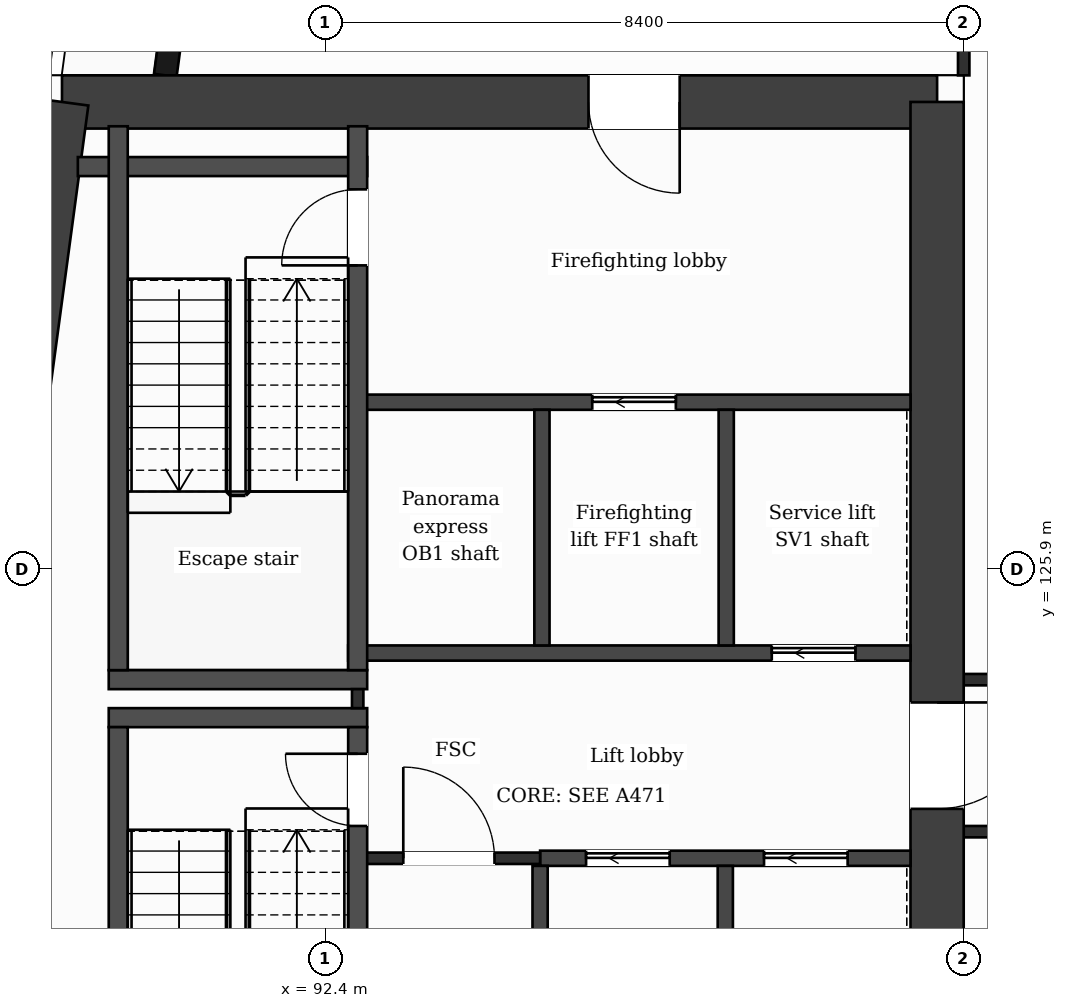
"""IFC4 building model, lengths in metres.
Left out: names, types, materials, properties, quantities, classifications, styles, units other than length and angle.
Written with IfcOpenShell. Run it as: python <this file> out.ifc"""

import sys

from ifc_helpers import new_model, si_unit, direction, frame, frame_2d, origin, place, context, subcontext, project, spatial, rectangle, extrude, element, fill, save


model = new_model("IFC4")
c1 = context("Model", 3, precision=1e-05, world=origin(), true_north=direction((0.0, 1.0)))
c2 = subcontext(c1, "Body", "Model", "MODEL_VIEW")
j1 = project(units=[si_unit("LENGTHUNIT", "METRE"), si_unit("PLANEANGLEUNIT", "RADIAN")], contexts=[c1])
p1 = place(None, origin())
s1 = spatial("IfcSite", under=j1, at=p1, CompositionType="ELEMENT")
p2 = place(p1, origin())
s2 = spatial("IfcBuilding", under=s1, at=p2, CompositionType="ELEMENT")
p3 = place(p2, frame((0.0, 0.0, 288.6)))
s3 = spatial("IfcBuildingStorey", under=s2, at=p3, CompositionType="ELEMENT", Elevation=288.6)
p4 = place(p3, frame((88.937, 132.05, 0.0), z_axis=(0.0, 0.0, 1.0), x_axis=(1.0, 0.0, 0.0)))
e1 = element("IfcWall", 1, at=p4, inside=s3, PredefinedType="SHEAR", context=c2, shape_type="SweptSolid", body=[
    extrude(rectangle(XDim=11.513, YDim=0.7, at=frame_2d((5.757, 0.0))), origin(), (0.0, 0.0, 1.0), 3.7),
])
p5 = place(p4, frame((6.927, 0.0, 0.0)))
e2 = element("IfcOpeningElement", 2, at=p5, cuts=e1, PredefinedType="OPENING", context=c2, shape_type="SweptSolid", body=[
    extrude(rectangle(XDim=1.2, YDim=2.1, at=frame_2d((0.6, 1.05))), frame((0.0, 0.36, 0.0), z_axis=(0.0, -1.0, 0.0), x_axis=(1.0, 0.0, 0.0)), (0.0, 0.0, 1.0), 0.72),
])
p6 = place(p3, frame((100.45, 132.05, 0.0), z_axis=(0.0, 0.0, 1.0), x_axis=(0.0, -1.0, 0.0)))
e3 = element("IfcWall", 3, at=p6, inside=s3, PredefinedType="SHEAR", context=c2, shape_type="SweptSolid", body=[
    extrude(rectangle(XDim=15.7, YDim=0.7, at=frame_2d((7.85, 0.0))), origin(), (0.0, 0.0, 1.0), 3.7),
])
p7 = place(p6, frame((7.9, 0.0, 0.0)))
e4 = element("IfcOpeningElement", 4, at=p7, cuts=e3, PredefinedType="OPENING", context=c2, shape_type="SweptSolid", body=[
    extrude(rectangle(XDim=1.4, YDim=2.1, at=frame_2d((0.7, 1.05))), frame((0.0, 0.36, 0.0), z_axis=(0.0, -1.0, 0.0), x_axis=(1.0, 0.0, 0.0)), (0.0, 0.0, 1.0), 0.72),
])
p8 = place(p3, frame((86.823, 116.35, 0.0), z_axis=(0.0, 0.0, 1.0), x_axis=(0.133416378607, 0.99106007382, 0.0)))
e5 = element("IfcWall", 5, at=p8, inside=s3, PredefinedType="SHEAR", context=c2, shape_type="SweptSolid", body=[
    extrude(rectangle(XDim=15.842, YDim=0.7, at=frame_2d((7.921, 0.0))), origin(), (0.0, 0.0, 1.0), 3.7),
])
p9 = place(p3, frame((91.177, 138.95, 0.0), z_axis=(0.0, 0.0, 1.0), x_axis=(-0.133426664613, -0.991058689065, 0.0)))
e6 = element("IfcWall", 6, at=p9, inside=s3, PredefinedType="SOLIDWALL", context=c2, shape_type="SweptSolid", body=[
    extrude(rectangle(XDim=6.609, YDim=0.3, at=frame_2d((3.305, 0.0))), origin(), (0.0, 0.0, 1.0), 3.38),
])
p10 = place(p9, frame((1.039, 0.0, 0.9)))
e7 = element("IfcOpeningElement", 7, at=p10, cuts=e6, PredefinedType="OPENING", context=c2, shape_type="SweptSolid", body=[
    extrude(rectangle(XDim=1.2, YDim=2.1, at=frame_2d((0.6, 1.05))), frame((0.0, 0.16, 0.0), z_axis=(0.0, -1.0, 0.0), x_axis=(1.0, 0.0, 0.0)), (0.0, 0.0, 1.0), 0.32),
])
p11 = place(p9, frame((4.294, 0.0, 0.0)))
e8 = element("IfcOpeningElement", 8, at=p11, cuts=e6, PredefinedType="OPENING", context=c2, shape_type="SweptSolid", body=[
    extrude(rectangle(XDim=1.2, YDim=2.4, at=frame_2d((0.6, 1.2))), frame((0.0, 0.16, 0.0), z_axis=(0.0, -1.0, 0.0), x_axis=(1.0, 0.0, 0.0)), (0.0, 0.0, 1.0), 0.32),
])
p12 = place(p3, frame((95.227, 122.1, 0.0), z_axis=(0.0, 0.0, 1.0), x_axis=(1.0, 0.0, 0.0)))
e9 = element("IfcWall", 9, at=p12, inside=s3, PredefinedType="PARTITIONING", context=c2, shape_type="SweptSolid", body=[
    extrude(rectangle(XDim=4.873, YDim=0.2, at=frame_2d((2.437, 0.0))), origin(), (0.0, 0.0, 1.0), 3.38),
])
p13 = place(p12, frame((0.605, 0.0, 0.0)))
e10 = element("IfcOpeningElement", 10, at=p13, cuts=e9, PredefinedType="OPENING", context=c2, shape_type="SweptSolid", body=[
    extrude(rectangle(XDim=1.1, YDim=2.1, at=frame_2d((0.55, 1.05))), frame((0.0, 0.11, 0.0), z_axis=(0.0, -1.0, 0.0), x_axis=(1.0, 0.0, 0.0)), (0.0, 0.0, 1.0), 0.22),
])
p14 = place(p12, frame((2.946, 0.0, 0.0)))
e11 = element("IfcOpeningElement", 11, at=p14, cuts=e9, PredefinedType="OPENING", context=c2, shape_type="SweptSolid", body=[
    extrude(rectangle(XDim=1.1, YDim=2.1, at=frame_2d((0.55, 1.05))), frame((0.0, 0.11, 0.0), z_axis=(0.0, -1.0, 0.0), x_axis=(1.0, 0.0, 0.0)), (0.0, 0.0, 1.0), 0.22),
])
p15 = place(p3, frame((92.827, 122.1, 0.0), z_axis=(0.0, 0.0, 1.0), x_axis=(1.0, 0.0, 0.0)))
e12 = element("IfcWall", 12, at=p15, inside=s3, PredefinedType="PARTITIONING", context=c2, shape_type="SweptSolid", body=[
    extrude(rectangle(XDim=2.4, YDim=0.15, at=frame_2d((1.2, 0.0))), origin(), (0.0, 0.0, 1.0), 3.38),
])
p16 = place(p15, frame((0.6, 0.0, 0.0)))
e13 = element("IfcOpeningElement", 13, at=p16, cuts=e12, PredefinedType="OPENING", context=c2, shape_type="SweptSolid", body=[
    extrude(rectangle(XDim=1.2, YDim=2.1, at=frame_2d((0.6, 1.05))), frame((0.0, 0.085, 0.0), z_axis=(0.0, -1.0, 0.0), x_axis=(1.0, 0.0, 0.0)), (0.0, 0.0, 1.0), 0.17),
])
p17 = place(p3, frame((100.8, 122.45, 0.0), z_axis=(0.0, 0.0, 1.0), x_axis=(1.0, 0.0, 0.0)))
e14 = element("IfcWall", 14, at=p17, inside=s3, PredefinedType="PARTITIONING", context=c2, shape_type="SweptSolid", body=[
    extrude(rectangle(XDim=25.2, YDim=0.15, at=frame_2d((12.6, 0.0))), origin(), (0.0, 0.0, 1.0), 3.38),
])
p18 = place(p17, frame((0.55, 0.0, 0.0)))
e15 = element("IfcOpeningElement", 15, at=p18, cuts=e14, PredefinedType="OPENING", context=c2, shape_type="SweptSolid", body=[
    extrude(rectangle(XDim=1.0, YDim=2.1, at=frame_2d((0.5, 1.05))), frame((0.0, 0.085, 0.0), z_axis=(0.0, -1.0, 0.0), x_axis=(1.0, 0.0, 0.0)), (0.0, 0.0, 1.0), 0.17),
])
p19 = place(p17, frame((9.375, 0.0, 0.0)))
e16 = element("IfcOpeningElement", 16, at=p19, cuts=e14, PredefinedType="OPENING", context=c2, shape_type="SweptSolid", body=[
    extrude(rectangle(XDim=1.0, YDim=2.1, at=frame_2d((0.5, 1.05))), frame((0.0, 0.085, 0.0), z_axis=(0.0, -1.0, 0.0), x_axis=(1.0, 0.0, 0.0)), (0.0, 0.0, 1.0), 0.17),
])
p20 = place(p17, frame((13.23, 0.0, 0.0)))
e17 = element("IfcOpeningElement", 17, at=p20, cuts=e14, PredefinedType="OPENING", context=c2, shape_type="SweptSolid", body=[
    extrude(rectangle(XDim=1.0, YDim=2.1, at=frame_2d((0.5, 1.05))), frame((0.0, 0.085, 0.0), z_axis=(0.0, -1.0, 0.0), x_axis=(1.0, 0.0, 0.0)), (0.0, 0.0, 1.0), 0.17),
])
p21 = place(p17, frame((19.513, 0.0, 0.0)))
e18 = element("IfcOpeningElement", 18, at=p21, cuts=e14, PredefinedType="OPENING", context=c2, shape_type="SweptSolid", body=[
    extrude(rectangle(XDim=0.95, YDim=2.1, at=frame_2d((0.475, 1.05))), frame((0.0, 0.085, 0.0), z_axis=(0.0, -1.0, 0.0), x_axis=(1.0, 0.0, 0.0)), (0.0, 0.0, 1.0), 0.17),
])
p22 = place(p17, frame((21.7, 0.0, 0.0)))
e19 = element("IfcOpeningElement", 19, at=p22, cuts=e14, PredefinedType="OPENING", context=c2, shape_type="SweptSolid", body=[
    extrude(rectangle(XDim=1.0, YDim=2.1, at=frame_2d((0.5, 1.05))), frame((0.0, 0.085, 0.0), z_axis=(0.0, -1.0, 0.0), x_axis=(1.0, 0.0, 0.0)), (0.0, 0.0, 1.0), 0.17),
])
for number, where, z_axis, x_axis in (
    (20, (89.552, 123.95, 0.0), (0.0, 0.0, 1.0), (1.0, 0.0, 0.0)),
    (21, (89.552, 124.45, 0.0), (0.0, 0.0, 1.0), (1.0, 0.0, 0.0)),
):
    element("IfcWall", number, at=place(p3, frame(where, z_axis=z_axis, x_axis=x_axis)), inside=s3, PredefinedType="PARTITIONING", context=c2, shape_type="SweptSolid", body=[
        extrude(rectangle(XDim=3.4, YDim=0.25, at=frame_2d((1.7, 0.0))), origin(), (0.0, 0.0, 1.0), 3.38),
    ])
p23 = place(p3, frame((100.8, 124.45, 0.0), z_axis=(0.0, 0.0, 1.0), x_axis=(1.0, 0.0, 0.0)))
e22 = element("IfcWall", 22, at=p23, inside=s3, PredefinedType="PARTITIONING", context=c2, shape_type="SweptSolid", body=[
    extrude(rectangle(XDim=25.2, YDim=0.15, at=frame_2d((12.6, 0.0))), origin(), (0.0, 0.0, 1.0), 3.38),
])
p24 = place(p23, frame((21.075, 0.0, 0.0)))
e23 = element("IfcOpeningElement", 23, at=p24, cuts=e22, PredefinedType="OPENING", context=c2, shape_type="SweptSolid", body=[
    extrude(rectangle(XDim=1.0, YDim=2.1, at=frame_2d((0.5, 1.05))), frame((0.0, 0.085, 0.0), z_axis=(0.0, -1.0, 0.0), x_axis=(1.0, 0.0, 0.0)), (0.0, 0.0, 1.0), 0.17),
])
p25 = place(p23, frame((5.375, 0.0, 0.0)))
e24 = element("IfcOpeningElement", 24, at=p25, cuts=e22, PredefinedType="OPENING", context=c2, shape_type="SweptSolid", body=[
    extrude(rectangle(XDim=1.0, YDim=2.1, at=frame_2d((0.5, 1.05))), frame((0.0, 0.085, 0.0), z_axis=(0.0, -1.0, 0.0), x_axis=(1.0, 0.0, 0.0)), (0.0, 0.0, 1.0), 0.17),
])
p26 = place(p23, frame((12.1, 0.0, 0.0)))
e25 = element("IfcOpeningElement", 25, at=p26, cuts=e22, PredefinedType="OPENING", context=c2, shape_type="SweptSolid", body=[
    extrude(rectangle(XDim=1.0, YDim=2.1, at=frame_2d((0.5, 1.05))), frame((0.0, 0.085, 0.0), z_axis=(0.0, -1.0, 0.0), x_axis=(1.0, 0.0, 0.0)), (0.0, 0.0, 1.0), 0.17),
])
p27 = place(p23, frame((17.93, 0.0, 0.0)))
e26 = element("IfcOpeningElement", 26, at=p27, cuts=e22, PredefinedType="OPENING", context=c2, shape_type="SweptSolid", body=[
    extrude(rectangle(XDim=1.0, YDim=2.1, at=frame_2d((0.5, 1.05))), frame((0.0, 0.085, 0.0), z_axis=(0.0, -1.0, 0.0), x_axis=(1.0, 0.0, 0.0)), (0.0, 0.0, 1.0), 0.17),
])
p28 = place(p3, frame((92.702, 124.8, 0.0), z_axis=(0.0, 0.0, 1.0), x_axis=(1.0, 0.0, 0.0)))
e27 = element("IfcWall", 27, at=p28, inside=s3, PredefinedType="PARTITIONING", context=c2, shape_type="SweptSolid", body=[
    extrude(rectangle(XDim=7.398, YDim=0.2, at=frame_2d((3.699, 0.0))), origin(), (0.0, 0.0, 1.0), 3.38),
])
p29 = place(p28, frame((5.573, 0.0, 0.0)))
e28 = element("IfcOpeningElement", 28, at=p29, cuts=e27, PredefinedType="OPENING", context=c2, shape_type="SweptSolid", body=[
    extrude(rectangle(XDim=1.1, YDim=2.1, at=frame_2d((0.55, 1.05))), frame((0.0, 0.11, 0.0), z_axis=(0.0, -1.0, 0.0), x_axis=(1.0, 0.0, 0.0)), (0.0, 0.0, 1.0), 0.22),
])
p30 = place(p3, frame((92.827, 128.1, 0.0), z_axis=(0.0, 0.0, 1.0), x_axis=(1.0, 0.0, 0.0)))
e29 = element("IfcWall", 29, at=p30, inside=s3, PredefinedType="PARTITIONING", context=c2, shape_type="SweptSolid", body=[
    extrude(rectangle(XDim=7.273, YDim=0.2, at=frame_2d((3.637, 0.0))), origin(), (0.0, 0.0, 1.0), 3.38),
])
p31 = place(p30, frame((3.086, 0.0, 0.0)))
e30 = element("IfcOpeningElement", 30, at=p31, cuts=e29, PredefinedType="OPENING", context=c2, shape_type="SweptSolid", body=[
    extrude(rectangle(XDim=1.1, YDim=2.1, at=frame_2d((0.55, 1.05))), frame((0.0, 0.11, 0.0), z_axis=(0.0, -1.0, 0.0), x_axis=(1.0, 0.0, 0.0)), (0.0, 0.0, 1.0), 0.22),
])
p32 = place(p3, frame((89.146, 131.2, 0.0), z_axis=(0.0, 0.0, 1.0), x_axis=(1.0, 0.0, 0.0)))
e31 = element("IfcWall", 31, at=p32, inside=s3, PredefinedType="PARTITIONING", context=c2, shape_type="SweptSolid", body=[
    extrude(rectangle(XDim=3.806, YDim=0.25, at=frame_2d((1.903, 0.0))), origin(), (0.0, 0.0, 1.0), 3.38),
])
for number, where, z_axis, x_axis in (
    (32, (89.677, 116.67, 0.0), (0.0, 0.0, 1.0), (0.0, 1.0, 0.0)),
    (33, (89.677, 124.575, 0.0), (0.0, 0.0, 1.0), (0.0, 1.0, 0.0)),
):
    element("IfcWall", number, at=place(p3, frame(where, z_axis=z_axis, x_axis=x_axis)), inside=s3, PredefinedType="PARTITIONING", context=c2, shape_type="SweptSolid", body=[
        extrude(rectangle(XDim=7.155, YDim=0.25, at=frame_2d((3.578, 0.0))), origin(), (0.0, 0.0, 1.0), 3.38),
    ])
p33 = place(p3, frame((92.827, 124.075, 0.0), z_axis=(0.0, 0.0, 1.0), x_axis=(0.0, 1.0, 0.0)))
e34 = element("IfcWall", 34, at=p33, inside=s3, PredefinedType="PARTITIONING", context=c2, shape_type="SweptSolid", body=[
    extrude(rectangle(XDim=0.25, YDim=0.15, at=frame_2d((0.125, 0.0))), origin(), (0.0, 0.0, 1.0), 3.38),
])
p34 = place(p3, frame((92.827, 116.67, 0.0), z_axis=(0.0, 0.0, 1.0), x_axis=(0.0, 1.0, 0.0)))
e35 = element("IfcWall", 35, at=p34, inside=s3, PredefinedType="PARTITIONING", context=c2, shape_type="SweptSolid", body=[
    extrude(rectangle(XDim=7.155, YDim=0.25, at=frame_2d((3.578, 0.0))), origin(), (0.0, 0.0, 1.0), 3.38),
])
p35 = place(p34, frame((5.855, 0.0, 0.0)))
e36 = element("IfcOpeningElement", 36, at=p35, cuts=e35, PredefinedType="OPENING", context=c2, shape_type="SweptSolid", body=[
    extrude(rectangle(XDim=0.95, YDim=2.1, at=frame_2d((0.475, 1.05))), frame((0.0, 0.135, 0.0), z_axis=(0.0, -1.0, 0.0), x_axis=(1.0, 0.0, 0.0)), (0.0, 0.0, 1.0), 0.27),
])
p36 = place(p3, frame((92.827, 124.575, 0.0), z_axis=(0.0, 0.0, 1.0), x_axis=(0.0, 1.0, 0.0)))
e37 = element("IfcWall", 37, at=p36, inside=s3, PredefinedType="PARTITIONING", context=c2, shape_type="SweptSolid", body=[
    extrude(rectangle(XDim=7.155, YDim=0.25, at=frame_2d((3.578, 0.0))), origin(), (0.0, 0.0, 1.0), 3.38),
])
p37 = place(p36, frame((5.325, 0.0, 0.0)))
e38 = element("IfcOpeningElement", 38, at=p37, cuts=e37, PredefinedType="OPENING", context=c2, shape_type="SweptSolid", body=[
    extrude(rectangle(XDim=1.0, YDim=2.1, at=frame_2d((0.5, 1.05))), frame((0.0, 0.135, 0.0), z_axis=(0.0, -1.0, 0.0), x_axis=(1.0, 0.0, 0.0)), (0.0, 0.0, 1.0), 0.27),
])
p38 = place(p3, frame((95.227, 116.67, 0.0), z_axis=(0.0, 0.0, 1.0), x_axis=(0.0, 1.0, 0.0)))
e39 = element("IfcWall", 39, at=p38, inside=s3, PredefinedType="PARTITIONING", context=c2, shape_type="SweptSolid", body=[
    extrude(rectangle(XDim=5.33, YDim=0.2, at=frame_2d((2.665, 0.0))), origin(), (0.0, 0.0, 1.0), 3.38),
])
p39 = place(p38, frame((0.88, 0.0, 0.0)))
e40 = element("IfcOpeningElement", 40, at=p39, cuts=e39, PredefinedType="OPENING", context=c2, shape_type="SweptSolid", body=[
    extrude(rectangle(XDim=0.9, YDim=2.1, at=frame_2d((0.45, 1.05))), frame((0.0, 0.11, 0.0), z_axis=(0.0, -1.0, 0.0), x_axis=(1.0, 0.0, 0.0)), (0.0, 0.0, 1.0), 0.22),
])
for number, where, z_axis, x_axis in (
    (41, (95.251, 124.9, 0.0), (0.0, 0.0, 1.0), (0.0, 1.0, 0.0)),
    (42, (97.664, 118.9, 0.0), (0.0, 0.0, 1.0), (0.0, 1.0, 0.0)),
    (43, (97.676, 124.9, 0.0), (0.0, 0.0, 1.0), (0.0, 1.0, 0.0)),
):
    element("IfcWall", number, at=place(p3, frame(where, z_axis=z_axis, x_axis=x_axis)), inside=s3, PredefinedType="PARTITIONING", context=c2, shape_type="SweptSolid", body=[
        extrude(rectangle(XDim=3.1, YDim=0.2, at=frame_2d((1.55, 0.0))), origin(), (0.0, 0.0, 1.0), 3.38),
    ])
p40 = place(p3, frame((100.8, 132.4, 0.0), z_axis=(0.0, 0.0, 1.0), x_axis=(0.0, 1.0, 0.0)))
e44 = element("IfcWall", 44, at=p40, inside=s3, PredefinedType="PARTITIONING", context=c2, shape_type="SweptSolid", body=[
    extrude(rectangle(XDim=1.325, YDim=0.15, at=frame_2d((0.663, 0.0))), origin(), (0.0, 0.0, 1.0), 3.38),
])
p41 = place(p16, origin())
e45 = element("IfcDoor", 45, at=p41, inside=s3, OperationType="SINGLE_SWING_LEFT", PredefinedType="DOOR", context=c2, shape_type="SweptSolid", body=[
    extrude(rectangle(XDim=1.2, YDim=2.1, at=frame_2d((0.6, 1.05))), frame((0.0, 0.025, 0.0), z_axis=(0.0, -1.0, 0.0), x_axis=(1.0, 0.0, 0.0)), (0.0, 0.0, 1.0), 0.05),
])
fill(e13, e45)
p42 = place(p13, origin())
e46 = element("IfcDoor", 46, at=p42, inside=s3, OperationType="SLIDING_TO_LEFT", PredefinedType="DOOR", context=c2, shape_type="SweptSolid", body=[
    extrude(rectangle(XDim=1.1, YDim=2.1, at=frame_2d((0.55, 1.05))), frame((0.0, 0.025, 0.0), z_axis=(0.0, -1.0, 0.0), x_axis=(1.0, 0.0, 0.0)), (0.0, 0.0, 1.0), 0.05),
])
fill(e10, e46)
p43 = place(p14, origin())
e47 = element("IfcDoor", 47, at=p43, inside=s3, OperationType="SLIDING_TO_LEFT", PredefinedType="DOOR", context=c2, shape_type="SweptSolid", body=[
    extrude(rectangle(XDim=1.1, YDim=2.1, at=frame_2d((0.55, 1.05))), frame((0.0, 0.025, 0.0), z_axis=(0.0, -1.0, 0.0), x_axis=(1.0, 0.0, 0.0)), (0.0, 0.0, 1.0), 0.05),
])
fill(e11, e47)
p44 = place(p31, origin())
e48 = element("IfcDoor", 48, at=p44, inside=s3, OperationType="SLIDING_TO_LEFT", PredefinedType="DOOR", context=c2, shape_type="SweptSolid", body=[
    extrude(rectangle(XDim=1.1, YDim=2.1, at=frame_2d((0.55, 1.05))), frame((0.0, 0.025, 0.0), z_axis=(0.0, -1.0, 0.0), x_axis=(1.0, 0.0, 0.0)), (0.0, 0.0, 1.0), 0.05),
])
fill(e30, e48)
p45 = place(p29, origin())
e49 = element("IfcDoor", 49, at=p45, inside=s3, OperationType="SLIDING_TO_LEFT", PredefinedType="DOOR", context=c2, shape_type="SweptSolid", body=[
    extrude(rectangle(XDim=1.1, YDim=2.1, at=frame_2d((0.55, 1.05))), frame((0.0, 0.025, 0.0), z_axis=(0.0, -1.0, 0.0), x_axis=(1.0, 0.0, 0.0)), (0.0, 0.0, 1.0), 0.05),
])
fill(e28, e49)
p46 = place(p35, origin())
e50 = element("IfcDoor", 50, at=p46, inside=s3, OperationType="SINGLE_SWING_RIGHT", PredefinedType="DOOR", context=c2, shape_type="SweptSolid", body=[
    extrude(rectangle(XDim=0.95, YDim=2.1, at=frame_2d((0.475, 1.05))), frame((0.0, 0.025, 0.0), z_axis=(0.0, -1.0, 0.0), x_axis=(1.0, 0.0, 0.0)), (0.0, 0.0, 1.0), 0.05),
])
fill(e36, e50)
p47 = place(p37, origin())
e51 = element("IfcDoor", 51, at=p47, inside=s3, OperationType="SINGLE_SWING_LEFT", PredefinedType="DOOR", context=c2, shape_type="SweptSolid", body=[
    extrude(rectangle(XDim=1.0, YDim=2.1, at=frame_2d((0.5, 1.05))), frame((0.0, 0.025, 0.0), z_axis=(0.0, -1.0, 0.0), x_axis=(1.0, 0.0, 0.0)), (0.0, 0.0, 1.0), 0.05),
])
fill(e38, e51)
p48 = place(p5, origin())
e52 = element("IfcDoor", 52, at=p48, inside=s3, OperationType="SINGLE_SWING_RIGHT", PredefinedType="DOOR", context=c2, shape_type="SweptSolid", body=[
    extrude(rectangle(XDim=1.2, YDim=2.1, at=frame_2d((0.6, 1.05))), frame((0.0, 0.025, 0.0), z_axis=(0.0, -1.0, 0.0), x_axis=(1.0, 0.0, 0.0)), (0.0, 0.0, 1.0), 0.05),
])
fill(e2, e52)
p49 = place(p7, origin())
e53 = element("IfcDoor", 53, at=p49, inside=s3, OperationType="SINGLE_SWING_LEFT", PredefinedType="DOOR", context=c2, shape_type="SweptSolid", body=[
    extrude(rectangle(XDim=1.4, YDim=2.1, at=frame_2d((0.7, 1.05))), frame((0.0, 0.025, 0.0), z_axis=(0.0, -1.0, 0.0), x_axis=(1.0, 0.0, 0.0)), (0.0, 0.0, 1.0), 0.05),
])
fill(e4, e53)
save(model, sys.argv[1])
